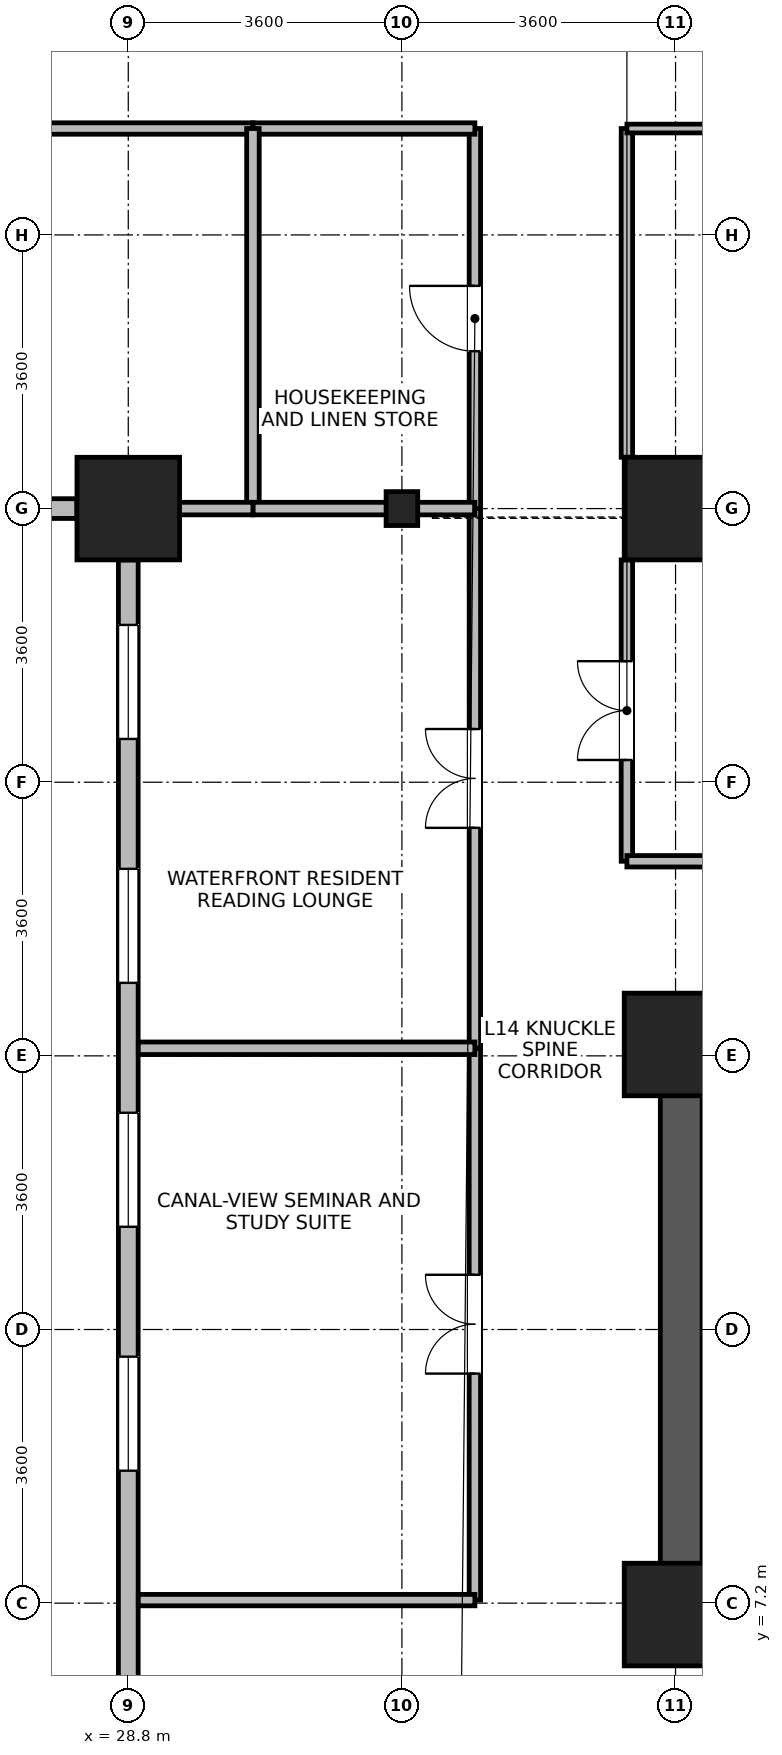
"""IFC4 building model, lengths in metres.
Left out: names, types, materials, properties, quantities, classifications, styles, units other than length and angle.
Written with IfcOpenShell. Run it as: python <this file> out.ifc"""

import sys

from ifc_helpers import new_model, si_unit, direction, frame, frame_2d, origin, origin_2d, place, context, subcontext, project, spatial, rectangle, i_section, extrude, source, transform, mapped, element, fill, save


model = new_model("IFC4")
c1 = context("Model", 3, precision=1e-05, world=origin(), true_north=direction((0.0, 1.0)))
c2 = subcontext(c1, "Body", "Model", "MODEL_VIEW")
j1 = project(units=[si_unit("LENGTHUNIT", "METRE"), si_unit("PLANEANGLEUNIT", "RADIAN")], contexts=[c1])
p1 = place(None, origin())
s1 = spatial("IfcSite", under=j1, at=p1, CompositionType="ELEMENT")
p2 = place(p1, origin())
s2 = spatial("IfcBuilding", under=s1, at=p2, CompositionType="ELEMENT")
p3 = place(p2, frame((0.0, 0.0, 58.6)))
s3 = spatial("IfcBuildingStorey", under=s2, at=p3, CompositionType="ELEMENT", Elevation=58.6)
p4 = place(p3, frame((36.075, 6.75, 0.0), z_axis=(0.0, 0.0, 1.0), x_axis=(0.0, 1.0, 0.0)))
e1 = element("IfcWall", 1, at=p4, inside=s3, PredefinedType="SHEAR", context=c2, shape_type="SweptSolid", body=[
    extrude(rectangle(XDim=8.1, YDim=0.55, at=frame_2d((4.05, 0.0))), origin(), (0.0, 0.0, 1.0), 3.45),
])
m1 = source(origin(), c2, "Body", "SweptSolid", [
    extrude(rectangle(XDim=1.35, YDim=1.35, at=origin_2d()), origin(), (0.0, 0.0, 1.0), 3.7),
])
for number, where, z_axis, x_axis in (
    (2, (28.8, 21.6, 0.0), (0.0, 0.0, 1.0), (1.0, 0.0, 0.0)),
    (3, (36.0, 21.6, 0.0), (0.0, 0.0, 1.0), (1.0, 0.0, 0.0)),
    (4, (36.0, 7.05, 0.0), (0.0, 0.0, 1.0), (1.0, 0.0, 0.0)),
    (5, (36.0, 14.55, 0.0), (0.0, 0.0, 1.0), (1.0, 0.0, 0.0)),
):
    element("IfcColumn", number, at=place(p3, frame(where, z_axis=z_axis, x_axis=x_axis)), inside=s3, PredefinedType="COLUMN", context=c2, shape_type="MappedRepresentation", body=[
        mapped(m1, transform((0.0, 0.0, 0.0), x_axis=(1.0, 0.0, 0.0), y_axis=(0.0, 1.0, 0.0), z_axis=(0.0, 0.0, 1.0), scale=1.0)),
    ])
m2 = source(origin(), c2, "Body", "SweptSolid", [
    extrude(i_section(OverallWidth=0.416, OverallDepth=0.446, WebThickness=0.029, FlangeThickness=0.04, FilletRadius=0.015, at=origin_2d()), origin(), (0.0, 0.0, 1.0), 3.7),
])
p5 = place(p3, frame((32.4, 21.6, 0.0), z_axis=(0.0, 0.0, 1.0), x_axis=(1.0, 0.0, 0.0)))
e6 = element("IfcColumn", 6, at=p5, inside=s3, PredefinedType="COLUMN", context=c2, shape_type="MappedRepresentation", body=[
    mapped(m2, transform((0.0, 0.0, 0.0), x_axis=(1.0, 0.0, 0.0), y_axis=(0.0, 1.0, 0.0), z_axis=(0.0, 0.0, 1.0), scale=1.0)),
])
p6 = place(p3, frame((28.124, 21.6, 0.0), z_axis=(0.0, 0.0, 1.0), x_axis=(-1.0, 0.0, 0.0)))
e7 = element("IfcWall", 7, at=p6, inside=s3, PredefinedType="STANDARD", context=c2, shape_type="SweptSolid", body=[
    extrude(rectangle(XDim=2.715, YDim=0.26, at=frame_2d((1.357, 0.0))), origin(), (0.0, 0.0, 1.0), 2.93),
])
p7 = place(p6, frame((0.883, 0.0, 0.85)))
e8 = element("IfcOpeningElement", 8, at=p7, cuts=e7, PredefinedType="OPENING", context=c2, shape_type="SweptSolid", body=[
    extrude(rectangle(XDim=0.95, YDim=1.75, at=frame_2d((0.475, 0.875))), frame((0.0, 0.14, 0.0), z_axis=(0.0, -1.0, 0.0), x_axis=(1.0, 0.0, 0.0)), (0.0, 0.0, 1.0), 0.28),
])
p8 = place(p3, frame((28.8, 1.67, 0.0), z_axis=(0.0, 0.0, 1.0), x_axis=(0.0, 1.0, 0.0)))
e9 = element("IfcWall", 9, at=p8, inside=s3, PredefinedType="STANDARD", context=c2, shape_type="SweptSolid", body=[
    extrude(rectangle(XDim=19.254, YDim=0.26, at=frame_2d((9.627, 0.0))), origin(), (0.0, 0.0, 1.0), 3.43),
])
p9 = place(p8, frame((0.854, 0.0, 0.85)))
e10 = element("IfcOpeningElement", 10, at=p9, cuts=e9, PredefinedType="OPENING", context=c2, shape_type="SweptSolid", body=[
    extrude(rectangle(XDim=1.5, YDim=1.85, at=frame_2d((0.75, 0.925))), frame((0.0, 0.14, 0.0), z_axis=(0.0, -1.0, 0.0), x_axis=(1.0, 0.0, 0.0)), (0.0, 0.0, 1.0), 0.28),
])
p10 = place(p8, frame((7.272, 0.0, 0.85)))
e11 = element("IfcOpeningElement", 11, at=p10, cuts=e9, PredefinedType="OPENING", context=c2, shape_type="SweptSolid", body=[
    extrude(rectangle(XDim=1.5, YDim=1.85, at=frame_2d((0.75, 0.925))), frame((0.0, 0.14, 0.0), z_axis=(0.0, -1.0, 0.0), x_axis=(1.0, 0.0, 0.0)), (0.0, 0.0, 1.0), 0.28),
])
p11 = place(p8, frame((10.481, 0.0, 0.85)))
e12 = element("IfcOpeningElement", 12, at=p11, cuts=e9, PredefinedType="OPENING", context=c2, shape_type="SweptSolid", body=[
    extrude(rectangle(XDim=1.5, YDim=1.85, at=frame_2d((0.75, 0.925))), frame((0.0, 0.14, 0.0), z_axis=(0.0, -1.0, 0.0), x_axis=(1.0, 0.0, 0.0)), (0.0, 0.0, 1.0), 0.28),
])
p12 = place(p8, frame((13.69, 0.0, 0.85)))
e13 = element("IfcOpeningElement", 13, at=p12, cuts=e9, PredefinedType="OPENING", context=c2, shape_type="SweptSolid", body=[
    extrude(rectangle(XDim=1.5, YDim=1.85, at=frame_2d((0.75, 0.925))), frame((0.0, 0.14, 0.0), z_axis=(0.0, -1.0, 0.0), x_axis=(1.0, 0.0, 0.0)), (0.0, 0.0, 1.0), 0.28),
])
p13 = place(p8, frame((16.899, 0.0, 0.85)))
e14 = element("IfcOpeningElement", 14, at=p13, cuts=e9, PredefinedType="OPENING", context=c2, shape_type="SweptSolid", body=[
    extrude(rectangle(XDim=1.5, YDim=1.85, at=frame_2d((0.75, 0.925))), frame((0.0, 0.14, 0.0), z_axis=(0.0, -1.0, 0.0), x_axis=(1.0, 0.0, 0.0)), (0.0, 0.0, 1.0), 0.28),
])
p14 = place(p3, frame((18.04, 26.6, 0.0), z_axis=(0.0, 0.0, 1.0), x_axis=(1.0, 0.0, 0.0)))
e15 = element("IfcWall", 15, at=p14, inside=s3, PredefinedType="PARTITIONING", context=c2, shape_type="SweptSolid", body=[
    extrude(rectangle(XDim=12.4, YDim=0.15, at=frame_2d((6.2, 0.0))), origin(), (0.0, 0.0, 1.0), 3.43),
])
p15 = place(p14, frame((5.55, 0.0, 0.0)))
e16 = element("IfcOpeningElement", 16, at=p15, cuts=e15, PredefinedType="OPENING", context=c2, shape_type="SweptSolid", body=[
    extrude(rectangle(XDim=1.3, YDim=2.12, at=frame_2d((0.65, 1.06))), frame((0.0, 0.085, 0.0), z_axis=(0.0, -1.0, 0.0), x_axis=(1.0, 0.0, 0.0)), (0.0, 0.0, 1.0), 0.17),
])
p16 = place(p3, frame((35.36, 16.96, 0.0), z_axis=(0.0, 0.0, 1.0), x_axis=(0.0, 1.0, 0.0)))
e17 = element("IfcWall", 17, at=p16, inside=s3, PredefinedType="PARTITIONING", context=c2, shape_type="SweptSolid", body=[
    extrude(rectangle(XDim=3.965, YDim=0.15, at=frame_2d((1.982, 0.0))), origin(), (0.0, 0.0, 1.0), 3.43),
])
p17 = place(p16, frame((1.333, 0.0, 0.0)))
e18 = element("IfcOpeningElement", 18, at=p17, cuts=e17, PredefinedType="OPENING", context=c2, shape_type="SweptSolid", body=[
    extrude(rectangle(XDim=1.3, YDim=2.12, at=frame_2d((0.65, 1.06))), frame((0.0, 0.085, 0.0), z_axis=(0.0, -1.0, 0.0), x_axis=(1.0, 0.0, 0.0)), (0.0, 0.0, 1.0), 0.17),
])
p18 = place(p3, frame((35.36, 22.275, 0.0), z_axis=(0.0, 0.0, 1.0), x_axis=(0.0, 1.0, 0.0)))
e19 = element("IfcWall", 19, at=p18, inside=s3, PredefinedType="PARTITIONING", context=c2, shape_type="SweptSolid", body=[
    extrude(rectangle(XDim=4.325, YDim=0.15, at=frame_2d((2.163, 0.0))), origin(), (0.0, 0.0, 1.0), 3.43),
])
p19 = place(p3, frame((35.36, 16.96, 0.0), z_axis=(0.0, 0.0, 1.0), x_axis=(1.0, 0.0, 0.0)))
e20 = element("IfcWall", 20, at=p19, inside=s3, PredefinedType="PARTITIONING", context=c2, shape_type="SweptSolid", body=[
    extrude(rectangle(XDim=7.42, YDim=0.15, at=frame_2d((3.71, 0.0))), origin(), (0.0, 0.0, 1.0), 3.43),
])
p20 = place(p3, frame((33.36, 7.24, 0.0), z_axis=(0.0, 0.0, 1.0), x_axis=(0.0, 1.0, 0.0)))
e21 = element("IfcWall", 21, at=p20, inside=s3, PredefinedType="PARTITIONING", context=c2, shape_type="SweptSolid", body=[
    extrude(rectangle(XDim=7.26, YDim=0.15, at=frame_2d((3.63, 0.0))), origin(), (0.0, 0.0, 1.0), 3.43),
])
p21 = place(p20, frame((2.98, 0.0, 0.0)))
e22 = element("IfcOpeningElement", 22, at=p21, cuts=e21, PredefinedType="OPENING", context=c2, shape_type="SweptSolid", body=[
    extrude(rectangle(XDim=1.3, YDim=2.12, at=frame_2d((0.65, 1.06))), frame((0.0, 0.085, 0.0), z_axis=(0.0, -1.0, 0.0), x_axis=(1.0, 0.0, 0.0)), (0.0, 0.0, 1.0), 0.17),
])
p22 = place(p3, frame((33.36, 14.5, 0.0), z_axis=(0.0, 0.0, 1.0), x_axis=(0.0, 1.0, 0.0)))
e23 = element("IfcWall", 23, at=p22, inside=s3, PredefinedType="PARTITIONING", context=c2, shape_type="SweptSolid", body=[
    extrude(rectangle(XDim=7.1, YDim=0.15, at=frame_2d((3.55, 0.0))), origin(), (0.0, 0.0, 1.0), 3.43),
])
p23 = place(p22, frame((2.9, 0.0, 0.0)))
e24 = element("IfcOpeningElement", 24, at=p23, cuts=e23, PredefinedType="OPENING", context=c2, shape_type="SweptSolid", body=[
    extrude(rectangle(XDim=1.3, YDim=2.12, at=frame_2d((0.65, 1.06))), frame((0.0, 0.085, 0.0), z_axis=(0.0, -1.0, 0.0), x_axis=(1.0, 0.0, 0.0)), (0.0, 0.0, 1.0), 0.17),
])
p24 = place(p3, frame((33.36, 21.6, 0.0), z_axis=(0.0, 0.0, 1.0), x_axis=(0.0, 1.0, 0.0)))
e25 = element("IfcWall", 25, at=p24, inside=s3, PredefinedType="PARTITIONING", context=c2, shape_type="SweptSolid", body=[
    extrude(rectangle(XDim=5.0, YDim=0.15, at=frame_2d((2.5, 0.0))), origin(), (0.0, 0.0, 1.0), 3.43),
])
p25 = place(p24, frame((2.07, 0.0, 0.0)))
e26 = element("IfcOpeningElement", 26, at=p25, cuts=e25, PredefinedType="OPENING", context=c2, shape_type="SweptSolid", body=[
    extrude(rectangle(XDim=0.86, YDim=2.02, at=frame_2d((0.43, 1.01))), frame((0.0, 0.085, 0.0), z_axis=(0.0, -1.0, 0.0), x_axis=(1.0, 0.0, 0.0)), (0.0, 0.0, 1.0), 0.17),
])
p26 = place(p3, frame((28.932, 7.24, 0.0), z_axis=(0.0, 0.0, 1.0), x_axis=(1.0, 0.0, 0.0)))
e27 = element("IfcWall", 27, at=p26, inside=s3, PredefinedType="PARTITIONING", context=c2, shape_type="SweptSolid", body=[
    extrude(rectangle(XDim=4.428, YDim=0.15, at=frame_2d((2.214, 0.0))), origin(), (0.0, 0.0, 1.0), 3.43),
])
p27 = place(p3, frame((30.44, 26.6, 0.0), z_axis=(0.0, 0.0, 1.0), x_axis=(1.0, 0.0, 0.0)))
e28 = element("IfcWall", 28, at=p27, inside=s3, PredefinedType="PARTITIONING", context=c2, shape_type="SweptSolid", body=[
    extrude(rectangle(XDim=2.92, YDim=0.15, at=frame_2d((1.46, 0.0))), origin(), (0.0, 0.0, 1.0), 3.43),
])
p28 = place(p3, frame((35.36, 26.6, 0.0), z_axis=(0.0, 0.0, 1.0), x_axis=(1.0, 0.0, 0.0)))
e29 = element("IfcWall", 29, at=p28, inside=s3, PredefinedType="PARTITIONING", context=c2, shape_type="SweptSolid", body=[
    extrude(rectangle(XDim=7.42, YDim=0.115, at=frame_2d((3.71, 0.0))), origin(), (0.0, 0.0, 1.0), 3.43),
])
p29 = place(p3, frame((30.44, 21.6, 0.0), z_axis=(0.0, 0.0, 1.0), x_axis=(0.0, 1.0, 0.0)))
e30 = element("IfcWall", 30, at=p29, inside=s3, PredefinedType="PARTITIONING", context=c2, shape_type="SweptSolid", body=[
    extrude(rectangle(XDim=5.0, YDim=0.165, at=frame_2d((2.5, 0.0))), origin(), (0.0, 0.0, 1.0), 3.43),
])
p30 = place(p3, frame((28.932, 14.5, 0.0), z_axis=(0.0, 0.0, 1.0), x_axis=(1.0, 0.0, 0.0)))
e31 = element("IfcWall", 31, at=p30, inside=s3, PredefinedType="PARTITIONING", context=c2, shape_type="SweptSolid", body=[
    extrude(rectangle(XDim=4.428, YDim=0.165, at=frame_2d((2.214, 0.0))), origin(), (0.0, 0.0, 1.0), 3.43),
])
p31 = place(p3, frame((30.44, 21.6, 0.0), z_axis=(0.0, 0.0, 1.0), x_axis=(1.0, 0.0, 0.0)))
e32 = element("IfcWall", 32, at=p31, inside=s3, PredefinedType="PARTITIONING", context=c2, shape_type="SweptSolid", body=[
    extrude(rectangle(XDim=2.92, YDim=0.165, at=frame_2d((1.46, 0.0))), origin(), (0.0, 0.0, 1.0), 2.93),
])
p32 = place(p3, frame((28.932, 21.6, 0.0), z_axis=(0.0, 0.0, 1.0), x_axis=(1.0, 0.0, 0.0)))
e33 = element("IfcWall", 33, at=p32, inside=s3, PredefinedType="PARTITIONING", context=c2, shape_type="SweptSolid", body=[
    extrude(rectangle(XDim=1.508, YDim=0.165, at=frame_2d((0.754, 0.0))), origin(), (0.0, 0.0, 1.0), 2.93),
])
p33 = place(p10, origin())
e34 = element("IfcWindow", 34, at=p33, inside=s3, PartitioningType="SINGLE_PANEL", PredefinedType="WINDOW", context=c2, shape_type="SweptSolid", body=[
    extrude(rectangle(XDim=1.5, YDim=1.85, at=frame_2d((0.75, 0.925))), frame((0.0, 0.03, 0.0), z_axis=(0.0, -1.0, 0.0), x_axis=(1.0, 0.0, 0.0)), (0.0, 0.0, 1.0), 0.06),
])
fill(e11, e34)
p34 = place(p11, origin())
e35 = element("IfcWindow", 35, at=p34, inside=s3, PartitioningType="SINGLE_PANEL", PredefinedType="WINDOW", context=c2, shape_type="SweptSolid", body=[
    extrude(rectangle(XDim=1.5, YDim=1.85, at=frame_2d((0.75, 0.925))), frame((0.0, 0.03, 0.0), z_axis=(0.0, -1.0, 0.0), x_axis=(1.0, 0.0, 0.0)), (0.0, 0.0, 1.0), 0.06),
])
fill(e12, e35)
p35 = place(p12, origin())
e36 = element("IfcWindow", 36, at=p35, inside=s3, PartitioningType="SINGLE_PANEL", PredefinedType="WINDOW", context=c2, shape_type="SweptSolid", body=[
    extrude(rectangle(XDim=1.5, YDim=1.85, at=frame_2d((0.75, 0.925))), frame((0.0, 0.03, 0.0), z_axis=(0.0, -1.0, 0.0), x_axis=(1.0, 0.0, 0.0)), (0.0, 0.0, 1.0), 0.06),
])
fill(e13, e36)
p36 = place(p13, origin())
e37 = element("IfcWindow", 37, at=p36, inside=s3, PartitioningType="SINGLE_PANEL", PredefinedType="WINDOW", context=c2, shape_type="SweptSolid", body=[
    extrude(rectangle(XDim=1.5, YDim=1.85, at=frame_2d((0.75, 0.925))), frame((0.0, 0.03, 0.0), z_axis=(0.0, -1.0, 0.0), x_axis=(1.0, 0.0, 0.0)), (0.0, 0.0, 1.0), 0.06),
])
fill(e14, e37)
p37 = place(p17, origin())
e38 = element("IfcDoor", 38, at=p37, inside=s3, OperationType="DOUBLE_DOOR_SINGLE_SWING", PredefinedType="DOOR", context=c2, shape_type="SweptSolid", body=[
    extrude(rectangle(XDim=1.3, YDim=2.12, at=frame_2d((0.65, 1.06))), frame((0.0, 0.025, 0.0), z_axis=(0.0, -1.0, 0.0), x_axis=(1.0, 0.0, 0.0)), (0.0, 0.0, 1.0), 0.05),
])
fill(e18, e38)
p38 = place(p21, origin())
e39 = element("IfcDoor", 39, at=p38, inside=s3, OperationType="DOUBLE_DOOR_SINGLE_SWING", PredefinedType="DOOR", context=c2, shape_type="SweptSolid", body=[
    extrude(rectangle(XDim=1.3, YDim=2.12, at=frame_2d((0.65, 1.06))), frame((0.0, 0.025, 0.0), z_axis=(0.0, -1.0, 0.0), x_axis=(1.0, 0.0, 0.0)), (0.0, 0.0, 1.0), 0.05),
])
fill(e22, e39)
p39 = place(p23, origin())
e40 = element("IfcDoor", 40, at=p39, inside=s3, OperationType="DOUBLE_DOOR_SINGLE_SWING", PredefinedType="DOOR", context=c2, shape_type="SweptSolid", body=[
    extrude(rectangle(XDim=1.3, YDim=2.12, at=frame_2d((0.65, 1.06))), frame((0.0, 0.025, 0.0), z_axis=(0.0, -1.0, 0.0), x_axis=(1.0, 0.0, 0.0)), (0.0, 0.0, 1.0), 0.05),
])
fill(e24, e40)
p40 = place(p25, origin())
e41 = element("IfcDoor", 41, at=p40, inside=s3, OperationType="SINGLE_SWING_RIGHT", PredefinedType="DOOR", context=c2, shape_type="SweptSolid", body=[
    extrude(rectangle(XDim=0.86, YDim=2.02, at=frame_2d((0.43, 1.01))), frame((0.0, 0.025, 0.0), z_axis=(0.0, -1.0, 0.0), x_axis=(1.0, 0.0, 0.0)), (0.0, 0.0, 1.0), 0.05),
])
fill(e26, e41)
save(model, sys.argv[1])
